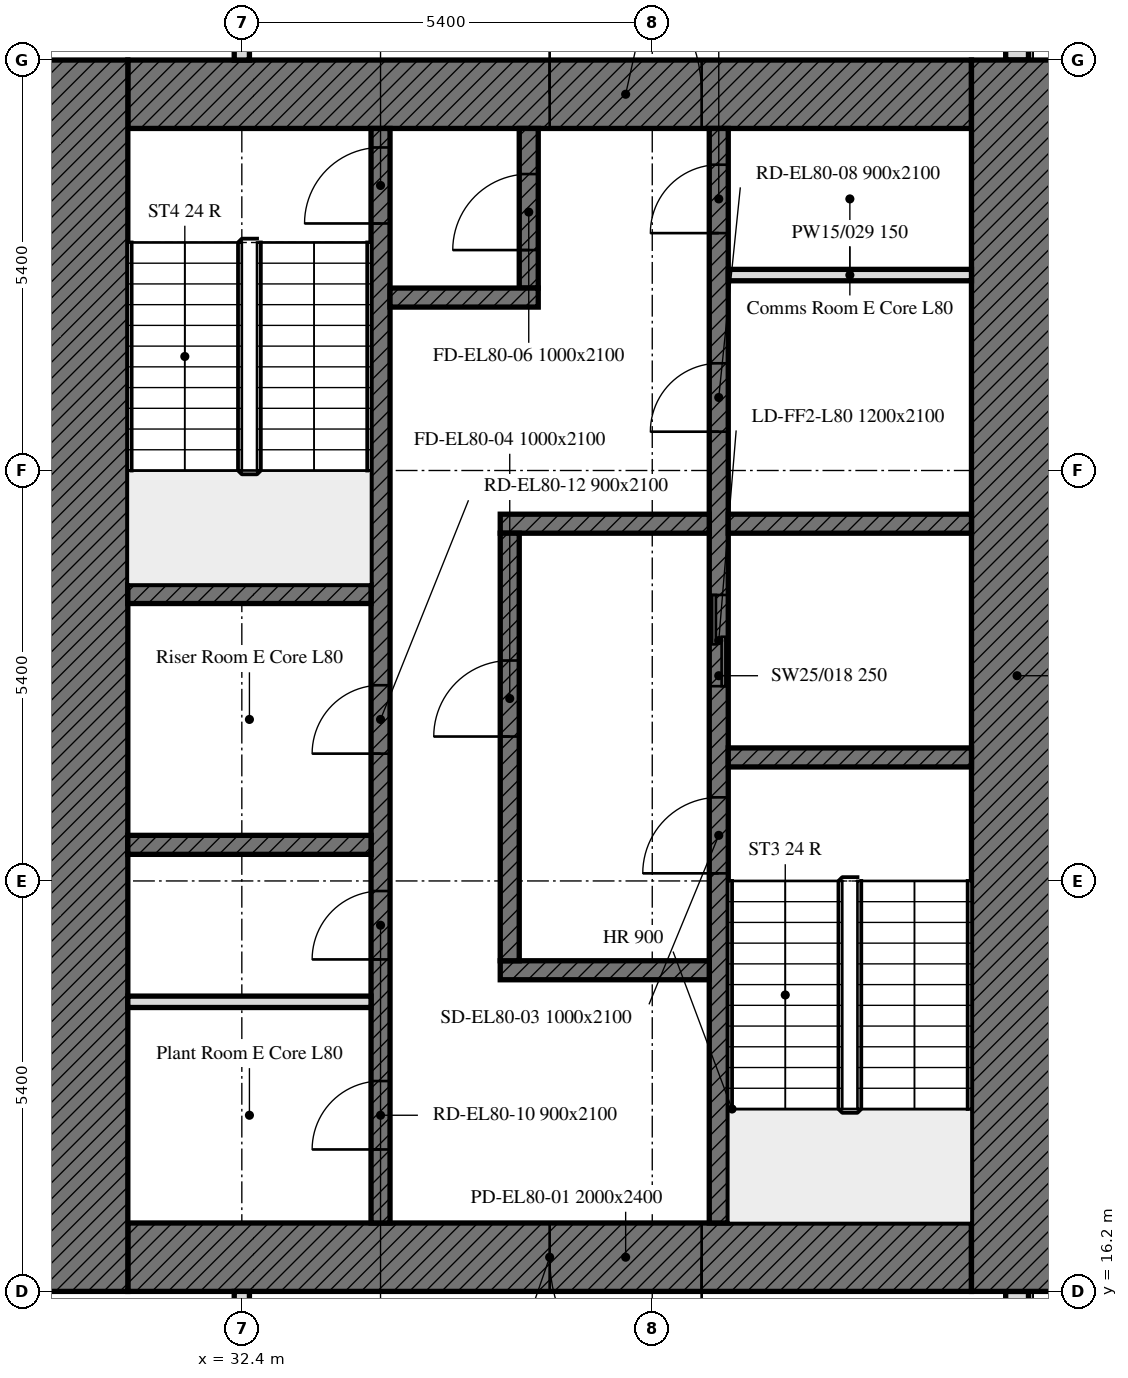
"""IFC4 building model, lengths in metres.
Left out: names, types, materials, properties, quantities, classifications, styles, units other than length and angle.
Written with IfcOpenShell. Run it as: python <this file> out.ifc"""

import sys

from ifc_helpers import new_model, si_unit, direction, frame, frame_2d, origin, place, context, subcontext, project, spatial, polyline, rectangle, outline, extrude, element, fill, save


model = new_model("IFC4")
c1 = context("Model", 3, precision=1e-05, world=origin(), true_north=direction((0.0, 1.0)))
c2 = subcontext(c1, "Body", "Model", "MODEL_VIEW")
j1 = project(units=[si_unit("LENGTHUNIT", "METRE"), si_unit("PLANEANGLEUNIT", "RADIAN")], contexts=[c1])
p1 = place(None, origin())
s1 = spatial("IfcSite", under=j1, at=p1, CompositionType="ELEMENT")
p2 = place(p1, origin())
s2 = spatial("IfcBuilding", under=s1, at=p2, CompositionType="ELEMENT")
p3 = place(p2, frame((0.0, 0.0, 321.7)))
s3 = spatial("IfcBuildingStorey", under=s2, at=p3, CompositionType="ELEMENT", Elevation=321.7)
p4 = place(p3, frame((42.6, 10.986, 0.0), z_axis=(0.0, 0.0, 1.0), x_axis=(0.0, 1.0, 0.0)))
e1 = element("IfcWall", 1, at=p4, inside=s3, PredefinedType="SOLIDWALL", context=c2, shape_type="SweptSolid", body=[
    extrude(outline(polyline([(0.0, 0.0), (5.214, 0.0), (5.214, 4.2), (4.634, 4.2), (4.055, 4.2), (3.476, 4.2), (2.896, 4.2), (2.317, 4.2), (1.738, 4.2), (1.159, 4.2), (0.579, 4.2), (0.0, 4.2), (0.0, 0.0)])), frame((0.0, 0.15, 0.0), z_axis=(0.0, -1.0, 0.0), x_axis=(1.0, 0.0, 0.0)), (0.0, 0.0, 1.0), 0.3),
])
p5 = place(p4, frame((1.014, 0.0, 0.6)))
e2 = element("IfcOpeningElement", 2, at=p5, cuts=e1, PredefinedType="OPENING", context=c2, shape_type="SweptSolid", body=[
    extrude(rectangle(XDim=3.0, YDim=1.8, at=frame_2d((1.5, 0.9))), frame((0.0, 0.16, 0.0), z_axis=(0.0, -1.0, 0.0), x_axis=(1.0, 0.0, 0.0)), (0.0, 0.0, 1.0), 0.32),
])
p6 = place(p3, frame((42.6, 32.4, 0.0), z_axis=(0.0, 0.0, 1.0), x_axis=(0.0, 1.0, 0.0)))
e3 = element("IfcWall", 3, at=p6, inside=s3, PredefinedType="SOLIDWALL", context=c2, shape_type="SweptSolid", body=[
    extrude(outline(polyline([(0.0, 0.0), (10.614, 0.0), (10.614, 4.2), (10.024, 4.2), (9.434, 4.2), (8.845, 4.2), (8.255, 4.2), (7.665, 4.2), (7.076, 4.2), (6.486, 4.2), (5.896, 4.2), (5.307, 4.2), (4.717, 4.2), (4.127, 4.2), (3.538, 4.2), (2.948, 4.2), (2.359, 4.2), (1.769, 4.2), (1.179, 4.2), (0.59, 4.2), (0.0, 4.2), (0.0, 0.0)])), frame((0.0, 0.15, 0.0), z_axis=(0.0, -1.0, 0.0), x_axis=(1.0, 0.0, 0.0)), (0.0, 0.0, 1.0), 0.3),
])
p7 = place(p6, frame((1.2, 0.0, 0.6)))
e4 = element("IfcOpeningElement", 4, at=p7, cuts=e3, PredefinedType="OPENING", context=c2, shape_type="SweptSolid", body=[
    extrude(rectangle(XDim=3.0, YDim=1.8, at=frame_2d((1.5, 0.9))), frame((0.0, 0.16, 0.0), z_axis=(0.0, -1.0, 0.0), x_axis=(1.0, 0.0, 0.0)), (0.0, 0.0, 1.0), 0.32),
])
p8 = place(p6, frame((7.396, 0.0, 0.6)))
e5 = element("IfcOpeningElement", 5, at=p8, cuts=e3, PredefinedType="OPENING", context=c2, shape_type="SweptSolid", body=[
    extrude(rectangle(XDim=1.4, YDim=1.8, at=frame_2d((0.7, 0.9))), frame((0.0, 0.16, 0.0), z_axis=(0.0, -1.0, 0.0), x_axis=(1.0, 0.0, 0.0)), (0.0, 0.0, 1.0), 0.32),
])
p9 = place(p3, frame((42.0, 16.65, 0.0), z_axis=(0.0, 0.0, 1.0), x_axis=(-1.0, 0.0, 0.0)))
e6 = element("IfcWall", 6, at=p9, inside=s3, PredefinedType="SOLIDWALL", context=c2, shape_type="SweptSolid", body=[
    extrude(rectangle(XDim=11.1, YDim=0.9, at=frame_2d((5.55, 0.0))), origin(), (0.0, 0.0, 1.0), 4.2),
])
p10 = place(p9, frame((3.55, 0.0, 0.0)))
e7 = element("IfcOpeningElement", 7, at=p10, cuts=e6, PredefinedType="OPENING", context=c2, shape_type="SweptSolid", body=[
    extrude(rectangle(XDim=2.0, YDim=2.4, at=frame_2d((1.0, 1.2))), frame((0.0, 0.45, 0.0), z_axis=(0.0, -1.0, 0.0), x_axis=(1.0, 0.0, 0.0)), (0.0, 0.0, 1.0), 0.9),
])
p11 = place(p3, frame((30.9, 31.95, 0.0), z_axis=(0.0, 0.0, 1.0), x_axis=(1.0, 0.0, 0.0)))
e8 = element("IfcWall", 8, at=p11, inside=s3, PredefinedType="SOLIDWALL", context=c2, shape_type="SweptSolid", body=[
    extrude(rectangle(XDim=11.1, YDim=0.9, at=frame_2d((5.55, 0.0))), origin(), (0.0, 0.0, 1.0), 4.2),
])
p12 = place(p11, frame((5.55, 0.0, 0.0)))
e9 = element("IfcOpeningElement", 9, at=p12, cuts=e8, PredefinedType="OPENING", context=c2, shape_type="SweptSolid", body=[
    extrude(rectangle(XDim=2.0, YDim=2.4, at=frame_2d((1.0, 1.2))), frame((0.0, 0.45, 0.0), z_axis=(0.0, -1.0, 0.0), x_axis=(1.0, 0.0, 0.0)), (0.0, 0.0, 1.0), 0.9),
])
for number, where, z_axis, x_axis in (
    (10, (42.6, 32.4, 0.0), (0.0, 0.0, 1.0), (0.0, -1.0, 0.0)),
    (11, (30.3, 16.2, 0.0), (0.0, 0.0, 1.0), (0.0, 1.0, 0.0)),
):
    element("IfcWall", number, at=place(p3, frame(where, z_axis=z_axis, x_axis=x_axis)), inside=s3, PredefinedType="SOLIDWALL", context=c2, shape_type="SweptSolid", body=[
        extrude(rectangle(XDim=16.2, YDim=1.2, at=frame_2d((8.1, 0.0))), origin(), (0.0, 0.0, 1.0), 4.2),
    ])
p13 = place(p3, frame((38.675, 17.1, 0.0), z_axis=(0.0, 0.0, 1.0), x_axis=(0.0, 1.0, 0.0)))
e12 = element("IfcWall", 12, at=p13, inside=s3, PredefinedType="SOLIDWALL", context=c2, shape_type="SweptSolid", body=[
    extrude(rectangle(XDim=14.4, YDim=0.25, at=frame_2d((7.2, 0.0))), origin(), (0.0, 0.0, 1.0), 4.2),
])
p14 = place(p13, frame((4.6, 0.0, 0.0)))
e13 = element("IfcOpeningElement", 13, at=p14, cuts=e12, PredefinedType="OPENING", context=c2, shape_type="SweptSolid", body=[
    extrude(rectangle(XDim=1.0, YDim=2.1, at=frame_2d((0.5, 1.05))), frame((0.0, 0.125, 0.0), z_axis=(0.0, -1.0, 0.0), x_axis=(1.0, 0.0, 0.0)), (0.0, 0.0, 1.0), 0.25),
])
p15 = place(p13, frame((7.062, 0.0, 0.0)))
e14 = element("IfcOpeningElement", 14, at=p15, cuts=e12, PredefinedType="OPENING", context=c2, shape_type="SweptSolid", body=[
    extrude(rectangle(XDim=1.2, YDim=2.1, at=frame_2d((0.6, 1.05))), frame((0.0, 0.125, 0.0), z_axis=(0.0, -1.0, 0.0), x_axis=(1.0, 0.0, 0.0)), (0.0, 0.0, 1.0), 0.25),
])
p16 = place(p13, frame((10.41, 0.0, 0.0)))
e15 = element("IfcOpeningElement", 15, at=p16, cuts=e12, PredefinedType="OPENING", context=c2, shape_type="SweptSolid", body=[
    extrude(rectangle(XDim=0.9, YDim=2.1, at=frame_2d((0.45, 1.05))), frame((0.0, 0.125, 0.0), z_axis=(0.0, -1.0, 0.0), x_axis=(1.0, 0.0, 0.0)), (0.0, 0.0, 1.0), 0.25),
])
p17 = place(p13, frame((13.023, 0.0, 0.0)))
e16 = element("IfcOpeningElement", 16, at=p17, cuts=e12, PredefinedType="OPENING", context=c2, shape_type="SweptSolid", body=[
    extrude(rectangle(XDim=0.9, YDim=2.1, at=frame_2d((0.45, 1.05))), frame((0.0, 0.125, 0.0), z_axis=(0.0, -1.0, 0.0), x_axis=(1.0, 0.0, 0.0)), (0.0, 0.0, 1.0), 0.25),
])
p18 = place(p3, frame((34.225, 17.1, 0.0), z_axis=(0.0, 0.0, 1.0), x_axis=(0.0, 1.0, 0.0)))
e17 = element("IfcWall", 17, at=p18, inside=s3, PredefinedType="SOLIDWALL", context=c2, shape_type="SweptSolid", body=[
    extrude(rectangle(XDim=14.4, YDim=0.25, at=frame_2d((7.2, 0.0))), origin(), (0.0, 0.0, 1.0), 4.2),
])
p19 = place(p18, frame((13.15, 0.0, 0.0)))
e18 = element("IfcOpeningElement", 18, at=p19, cuts=e17, PredefinedType="OPENING", context=c2, shape_type="SweptSolid", body=[
    extrude(rectangle(XDim=1.0, YDim=2.1, at=frame_2d((0.5, 1.05))), frame((0.0, 0.125, 0.0), z_axis=(0.0, -1.0, 0.0), x_axis=(1.0, 0.0, 0.0)), (0.0, 0.0, 1.0), 0.25),
])
p20 = place(p18, frame((0.968, 0.0, 0.0)))
e19 = element("IfcOpeningElement", 19, at=p20, cuts=e17, PredefinedType="OPENING", context=c2, shape_type="SweptSolid", body=[
    extrude(rectangle(XDim=0.9, YDim=2.1, at=frame_2d((0.45, 1.05))), frame((0.0, 0.125, 0.0), z_axis=(0.0, -1.0, 0.0), x_axis=(1.0, 0.0, 0.0)), (0.0, 0.0, 1.0), 0.25),
])
p21 = place(p18, frame((3.468, 0.0, 0.0)))
e20 = element("IfcOpeningElement", 20, at=p21, cuts=e17, PredefinedType="OPENING", context=c2, shape_type="SweptSolid", body=[
    extrude(rectangle(XDim=0.9, YDim=2.1, at=frame_2d((0.45, 1.05))), frame((0.0, 0.125, 0.0), z_axis=(0.0, -1.0, 0.0), x_axis=(1.0, 0.0, 0.0)), (0.0, 0.0, 1.0), 0.25),
])
p22 = place(p18, frame((6.175, 0.0, 0.0)))
e21 = element("IfcOpeningElement", 21, at=p22, cuts=e17, PredefinedType="OPENING", context=c2, shape_type="SweptSolid", body=[
    extrude(rectangle(XDim=0.9, YDim=2.1, at=frame_2d((0.45, 1.05))), frame((0.0, 0.125, 0.0), z_axis=(0.0, -1.0, 0.0), x_axis=(1.0, 0.0, 0.0)), (0.0, 0.0, 1.0), 0.25),
])
p23 = place(p3, frame((38.8, 23.225, 0.0), z_axis=(0.0, 0.0, 1.0), x_axis=(1.0, 0.0, 0.0)))
e22 = element("IfcWall", 22, at=p23, inside=s3, PredefinedType="SOLIDWALL", context=c2, shape_type="SweptSolid", body=[
    extrude(rectangle(XDim=3.2, YDim=0.25, at=frame_2d((1.6, 0.0))), origin(), (0.0, 0.0, 1.0), 4.2),
])
for number, where, z_axis, x_axis in (
    (23, (30.9, 25.375, 0.0), (0.0, 0.0, 1.0), (1.0, 0.0, 0.0)),
    (24, (30.9, 22.075, 0.0), (0.0, 0.0, 1.0), (1.0, 0.0, 0.0)),
):
    element("IfcWall", number, at=place(p3, frame(where, z_axis=z_axis, x_axis=x_axis)), inside=s3, PredefinedType="SOLIDWALL", context=c2, shape_type="SweptSolid", body=[
        extrude(rectangle(XDim=3.2, YDim=0.25, at=frame_2d((1.6, 0.0))), origin(), (0.0, 0.0, 1.0), 4.2),
    ])
p24 = place(p3, frame((38.8, 26.3, 0.0), z_axis=(0.0, 0.0, 1.0), x_axis=(1.0, 0.0, 0.0)))
e25 = element("IfcWall", 25, at=p24, inside=s3, PredefinedType="SOLIDWALL", context=c2, shape_type="SweptSolid", body=[
    extrude(rectangle(XDim=3.2, YDim=0.25, at=frame_2d((1.6, 0.0))), origin(), (0.0, 0.0, 1.0), 4.2),
])
for number, where, z_axis, x_axis in (
    (26, (35.8, 26.3, 0.0), (0.0, 0.0, 1.0), (1.0, 0.0, 0.0)),
    (27, (35.8, 20.425, 0.0), (0.0, 0.0, 1.0), (1.0, 0.0, 0.0)),
):
    element("IfcWall", number, at=place(p3, frame(where, z_axis=z_axis, x_axis=x_axis)), inside=s3, PredefinedType="SOLIDWALL", context=c2, shape_type="SweptSolid", body=[
        extrude(rectangle(XDim=2.75, YDim=0.25, at=frame_2d((1.375, 0.0))), origin(), (0.0, 0.0, 1.0), 4.2),
    ])
p25 = place(p3, frame((36.175, 29.4, 0.0), z_axis=(0.0, 0.0, 1.0), x_axis=(0.0, 1.0, 0.0)))
e28 = element("IfcWall", 28, at=p25, inside=s3, PredefinedType="SOLIDWALL", context=c2, shape_type="SweptSolid", body=[
    extrude(rectangle(XDim=2.1, YDim=0.25, at=frame_2d((1.05, 0.0))), origin(), (0.0, 0.0, 1.0), 4.2),
])
p26 = place(p25, frame((0.5, 0.0, 0.0)))
e29 = element("IfcOpeningElement", 29, at=p26, cuts=e28, PredefinedType="OPENING", context=c2, shape_type="SweptSolid", body=[
    extrude(rectangle(XDim=1.0, YDim=2.1, at=frame_2d((0.5, 1.05))), frame((0.0, 0.125, 0.0), z_axis=(0.0, -1.0, 0.0), x_axis=(1.0, 0.0, 0.0)), (0.0, 0.0, 1.0), 0.25),
])
p27 = place(p3, frame((34.35, 29.275, 0.0), z_axis=(0.0, 0.0, 1.0), x_axis=(1.0, 0.0, 0.0)))
e30 = element("IfcWall", 30, at=p27, inside=s3, PredefinedType="SOLIDWALL", context=c2, shape_type="SweptSolid", body=[
    extrude(rectangle(XDim=1.95, YDim=0.25, at=frame_2d((0.975, 0.0))), origin(), (0.0, 0.0, 1.0), 4.2),
])
p28 = place(p3, frame((35.925, 20.55, 0.0), z_axis=(0.0, 0.0, 1.0), x_axis=(0.0, 1.0, 0.0)))
e31 = element("IfcWall", 31, at=p28, inside=s3, PredefinedType="SOLIDWALL", context=c2, shape_type="SweptSolid", body=[
    extrude(rectangle(XDim=5.625, YDim=0.25, at=frame_2d((2.812, 0.0))), origin(), (0.0, 0.0, 1.0), 4.2),
])
p29 = place(p28, frame((2.95, 0.0, 0.0)))
e32 = element("IfcOpeningElement", 32, at=p29, cuts=e31, PredefinedType="OPENING", context=c2, shape_type="SweptSolid", body=[
    extrude(rectangle(XDim=1.0, YDim=2.1, at=frame_2d((0.5, 1.05))), frame((0.0, 0.125, 0.0), z_axis=(0.0, -1.0, 0.0), x_axis=(1.0, 0.0, 0.0)), (0.0, 0.0, 1.0), 0.25),
])
p30 = place(p3, frame((38.8, 29.571, 0.0), z_axis=(0.0, 0.0, 1.0), x_axis=(1.0, 0.0, 0.0)))
e33 = element("IfcWall", 33, at=p30, inside=s3, PredefinedType="PARTITIONING", context=c2, shape_type="SweptSolid", body=[
    extrude(rectangle(XDim=3.2, YDim=0.15, at=frame_2d((1.6, 0.0))), origin(), (0.0, 0.0, 1.0), 4.2),
])
p31 = place(p3, frame((30.9, 20.01, 0.0), z_axis=(0.0, 0.0, 1.0), x_axis=(1.0, 0.0, 0.0)))
e34 = element("IfcWall", 34, at=p31, inside=s3, PredefinedType="PARTITIONING", context=c2, shape_type="SweptSolid", body=[
    extrude(rectangle(XDim=3.2, YDim=0.15, at=frame_2d((1.6, 0.0))), origin(), (0.0, 0.0, 1.0), 4.2),
])
p32 = place(p3, frame((32.4, 32.4, 0.0), z_axis=(0.0, 0.0, 1.0), x_axis=(0.0, 1.0, 0.0)))
e35 = element("IfcWall", 35, at=p32, inside=s3, PredefinedType="PARTITIONING", context=c2, shape_type="SweptSolid", body=[
    extrude(rectangle(XDim=5.105, YDim=0.2, at=frame_2d((2.552, 0.0))), origin(), (0.0, 0.0, 1.0), 3.45),
])
p33 = place(p3, frame((32.4, 13.15, 0.0), z_axis=(0.0, 0.0, 1.0), x_axis=(0.0, 1.0, 0.0)))
e36 = element("IfcWall", 36, at=p33, inside=s3, PredefinedType="PARTITIONING", context=c2, shape_type="SweptSolid", body=[
    extrude(rectangle(XDim=3.05, YDim=0.2, at=frame_2d((1.525, 0.0))), origin(), (0.0, 0.0, 1.0), 4.2),
])
p34 = place(p10, origin())
e37 = element("IfcDoor", 37, at=p34, inside=s3, OperationType="DOUBLE_DOOR_SINGLE_SWING", PredefinedType="DOOR", context=c2, shape_type="SweptSolid", body=[
    extrude(rectangle(XDim=2.0, YDim=2.4, at=frame_2d((1.0, 1.2))), frame((0.0, 0.025, 0.0), z_axis=(0.0, -1.0, 0.0), x_axis=(1.0, 0.0, 0.0)), (0.0, 0.0, 1.0), 0.05),
])
fill(e7, e37)
p35 = place(p12, origin())
e38 = element("IfcDoor", 38, at=p35, inside=s3, OperationType="DOUBLE_DOOR_SINGLE_SWING", PredefinedType="DOOR", context=c2, shape_type="SweptSolid", body=[
    extrude(rectangle(XDim=2.0, YDim=2.4, at=frame_2d((1.0, 1.2))), frame((0.0, 0.025, 0.0), z_axis=(0.0, -1.0, 0.0), x_axis=(1.0, 0.0, 0.0)), (0.0, 0.0, 1.0), 0.05),
])
fill(e9, e38)
p36 = place(p14, origin())
e39 = element("IfcDoor", 39, at=p36, inside=s3, OperationType="SINGLE_SWING_LEFT", PredefinedType="DOOR", context=c2, shape_type="SweptSolid", body=[
    extrude(rectangle(XDim=1.0, YDim=2.1, at=frame_2d((0.5, 1.05))), frame((0.0, 0.025, 0.0), z_axis=(0.0, -1.0, 0.0), x_axis=(1.0, 0.0, 0.0)), (0.0, 0.0, 1.0), 0.05),
])
fill(e13, e39)
p37 = place(p29, origin())
e40 = element("IfcDoor", 40, at=p37, inside=s3, OperationType="SINGLE_SWING_LEFT", PredefinedType="DOOR", context=c2, shape_type="SweptSolid", body=[
    extrude(rectangle(XDim=1.0, YDim=2.1, at=frame_2d((0.5, 1.05))), frame((0.0, 0.025, 0.0), z_axis=(0.0, -1.0, 0.0), x_axis=(1.0, 0.0, 0.0)), (0.0, 0.0, 1.0), 0.05),
])
fill(e32, e40)
p38 = place(p19, origin())
e41 = element("IfcDoor", 41, at=p38, inside=s3, OperationType="SINGLE_SWING_LEFT", PredefinedType="DOOR", context=c2, shape_type="SweptSolid", body=[
    extrude(rectangle(XDim=1.0, YDim=2.1, at=frame_2d((0.5, 1.05))), frame((0.0, 0.025, 0.0), z_axis=(0.0, -1.0, 0.0), x_axis=(1.0, 0.0, 0.0)), (0.0, 0.0, 1.0), 0.05),
])
fill(e18, e41)
p39 = place(p26, origin())
e42 = element("IfcDoor", 42, at=p39, inside=s3, OperationType="SINGLE_SWING_LEFT", PredefinedType="DOOR", context=c2, shape_type="SweptSolid", body=[
    extrude(rectangle(XDim=1.0, YDim=2.1, at=frame_2d((0.5, 1.05))), frame((0.0, 0.025, 0.0), z_axis=(0.0, -1.0, 0.0), x_axis=(1.0, 0.0, 0.0)), (0.0, 0.0, 1.0), 0.05),
])
fill(e29, e42)
p40 = place(p15, origin())
e43 = element("IfcDoor", 43, at=p40, inside=s3, OperationType="DOUBLE_DOOR_SLIDING", PredefinedType="DOOR", context=c2, shape_type="SweptSolid", body=[
    extrude(rectangle(XDim=1.2, YDim=2.1, at=frame_2d((0.6, 1.05))), frame((0.0, 0.025, 0.0), z_axis=(0.0, -1.0, 0.0), x_axis=(1.0, 0.0, 0.0)), (0.0, 0.0, 1.0), 0.05),
])
fill(e14, e43)
p41 = place(p16, origin())
e44 = element("IfcDoor", 44, at=p41, inside=s3, OperationType="SINGLE_SWING_LEFT", PredefinedType="DOOR", context=c2, shape_type="SweptSolid", body=[
    extrude(rectangle(XDim=0.9, YDim=2.1, at=frame_2d((0.45, 1.05))), frame((0.0, 0.025, 0.0), z_axis=(0.0, -1.0, 0.0), x_axis=(1.0, 0.0, 0.0)), (0.0, 0.0, 1.0), 0.05),
])
fill(e15, e44)
p42 = place(p17, origin())
e45 = element("IfcDoor", 45, at=p42, inside=s3, OperationType="SINGLE_SWING_LEFT", PredefinedType="DOOR", context=c2, shape_type="SweptSolid", body=[
    extrude(rectangle(XDim=0.9, YDim=2.1, at=frame_2d((0.45, 1.05))), frame((0.0, 0.025, 0.0), z_axis=(0.0, -1.0, 0.0), x_axis=(1.0, 0.0, 0.0)), (0.0, 0.0, 1.0), 0.05),
])
fill(e16, e45)
p43 = place(p20, origin())
e46 = element("IfcDoor", 46, at=p43, inside=s3, OperationType="SINGLE_SWING_LEFT", PredefinedType="DOOR", context=c2, shape_type="SweptSolid", body=[
    extrude(rectangle(XDim=0.9, YDim=2.1, at=frame_2d((0.45, 1.05))), frame((0.0, 0.025, 0.0), z_axis=(0.0, -1.0, 0.0), x_axis=(1.0, 0.0, 0.0)), (0.0, 0.0, 1.0), 0.05),
])
fill(e19, e46)
p44 = place(p21, origin())
e47 = element("IfcDoor", 47, at=p44, inside=s3, OperationType="SINGLE_SWING_LEFT", PredefinedType="DOOR", context=c2, shape_type="SweptSolid", body=[
    extrude(rectangle(XDim=0.9, YDim=2.1, at=frame_2d((0.45, 1.05))), frame((0.0, 0.025, 0.0), z_axis=(0.0, -1.0, 0.0), x_axis=(1.0, 0.0, 0.0)), (0.0, 0.0, 1.0), 0.05),
])
fill(e20, e47)
p45 = place(p22, origin())
e48 = element("IfcDoor", 48, at=p45, inside=s3, OperationType="SINGLE_SWING_LEFT", PredefinedType="DOOR", context=c2, shape_type="SweptSolid", body=[
    extrude(rectangle(XDim=0.9, YDim=2.1, at=frame_2d((0.45, 1.05))), frame((0.0, 0.025, 0.0), z_axis=(0.0, -1.0, 0.0), x_axis=(1.0, 0.0, 0.0)), (0.0, 0.0, 1.0), 0.05),
])
fill(e21, e48)
save(model, sys.argv[1])
